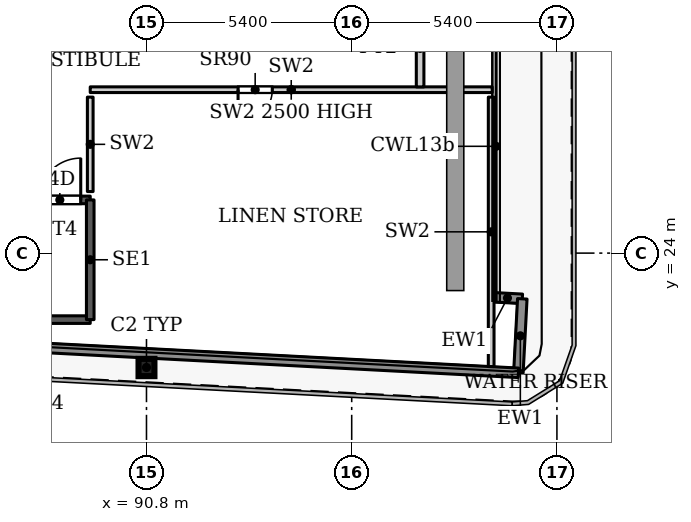
"""IFC4 building model, lengths in metres.
Left out: names, types, materials, properties, quantities, classifications, styles, units other than length and angle.
Written with IfcOpenShell. Run it as: python <this file> out.ifc"""

import sys

from ifc_helpers import new_model, si_unit, direction, frame, frame_2d, origin, origin_2d, place, context, subcontext, project, spatial, rectangle, i_section, extrude, source, transform, mapped, element, fill, save


model = new_model("IFC4")
c1 = context("Model", 3, precision=1e-05, world=origin(), true_north=direction((0.0, 1.0)))
c2 = subcontext(c1, "Body", "Model", "MODEL_VIEW")
j1 = project(units=[si_unit("LENGTHUNIT", "METRE"), si_unit("PLANEANGLEUNIT", "RADIAN")], contexts=[c1])
p1 = place(None, origin())
s1 = spatial("IfcSite", under=j1, at=p1, CompositionType="ELEMENT")
p2 = place(p1, origin())
s2 = spatial("IfcBuilding", under=s1, at=p2, CompositionType="ELEMENT")
p3 = place(p2, frame((0.0, 0.0, 117.5)))
s3 = spatial("IfcBuildingStorey", under=s2, at=p3, CompositionType="ELEMENT", Elevation=117.5)
p4 = place(p3, frame((90.8, 20.99, 0.0), z_axis=(0.0, 0.0, 1.0), x_axis=(1.0, 0.0, 0.0)))
e1 = element("IfcColumn", 1, at=p4, inside=s3, PredefinedType="COLUMN", context=c2, shape_type="SweptSolid", body=[
    extrude(i_section(OverallWidth=0.418, OverallDepth=0.455, WebThickness=0.042, FlangeThickness=0.068, FilletRadius=0.014, at=origin_2d()), origin(), (0.0, 0.0, 1.0), 3.9),
])
p5 = place(p3, frame((99.907, 22.839, 0.0), z_axis=(0.0, 0.0, 1.0), x_axis=(0.998561284263, -0.053622398031, 0.0)))
e2 = element("IfcWall", 2, at=p5, inside=s3, PredefinedType="SOLIDWALL", context=c2, shape_type="SweptSolid", body=[
    extrude(rectangle(XDim=0.783, YDim=0.25, at=frame_2d((0.392, 0.0))), origin(), (0.0, 0.0, 1.0), 3.75),
])
p6 = place(p3, frame((100.689, 22.797, 0.0), z_axis=(0.0, 0.0, 1.0), x_axis=(-0.052841433274, -0.998602915542, 0.0)))
e3 = element("IfcWall", 3, at=p6, inside=s3, PredefinedType="SOLIDWALL", context=c2, shape_type="SweptSolid", body=[
    extrude(rectangle(XDim=1.95, YDim=0.25, at=frame_2d((0.975, 0.0))), origin(), (0.0, 0.0, 1.0), 3.75),
])
p7 = place(p3, frame((100.586, 20.85, 0.0), z_axis=(0.0, 0.0, 1.0), x_axis=(-0.99861746497, 0.052565755559, 0.0)))
e4 = element("IfcWall", 4, at=p7, inside=s3, PredefinedType="SOLIDWALL", context=c2, shape_type="SweptSolid", body=[
    extrude(rectangle(XDim=66.639, YDim=0.25, at=frame_2d((33.319, 0.0))), origin(), (0.0, 0.0, 1.0), 3.75),
])
p8 = place(p3, frame((80.16, 22.25, 0.0), z_axis=(0.0, 0.0, 1.0), x_axis=(1.0, 0.0, 0.0)))
e5 = element("IfcWall", 5, at=p8, inside=s3, PredefinedType="SHEAR", context=c2, shape_type="SweptSolid", body=[
    extrude(rectangle(XDim=9.16, YDim=0.2, at=frame_2d((4.58, 0.0))), origin(), (0.0, 0.0, 1.0), 3.9),
])
p9 = place(p3, frame((80.16, 25.4, 0.0), z_axis=(0.0, 0.0, 1.0), x_axis=(1.0, 0.0, 0.0)))
e6 = element("IfcWall", 6, at=p9, inside=s3, PredefinedType="SHEAR", context=c2, shape_type="SweptSolid", body=[
    extrude(rectangle(XDim=9.16, YDim=0.2, at=frame_2d((4.58, 0.0))), origin(), (0.0, 0.0, 1.0), 3.9),
])
p10 = place(p9, frame((7.81, 0.0, 0.0)))
e7 = element("IfcOpeningElement", 7, at=p10, cuts=e6, PredefinedType="OPENING", context=c2, shape_type="SweptSolid", body=[
    extrude(rectangle(XDim=1.1, YDim=2.2, at=frame_2d((0.55, 1.1))), frame((0.0, 0.11, 0.0), z_axis=(0.0, -1.0, 0.0), x_axis=(1.0, 0.0, 0.0)), (0.0, 0.0, 1.0), 0.22),
])
p11 = place(p3, frame((89.32, 22.25, 0.0), z_axis=(0.0, 0.0, 1.0), x_axis=(0.0, 1.0, 0.0)))
e8 = element("IfcWall", 8, at=p11, inside=s3, PredefinedType="SHEAR", context=c2, shape_type="SweptSolid", body=[
    extrude(rectangle(XDim=3.15, YDim=0.2, at=frame_2d((1.575, 0.0))), origin(), (0.0, 0.0, 1.0), 3.9),
])
p12 = place(p3, frame((89.32, 28.3, 0.0), z_axis=(0.0, 0.0, 1.0), x_axis=(1.0, 0.0, 0.0)))
e9 = element("IfcWall", 9, at=p12, inside=s3, PredefinedType="PARTITIONING", context=c2, shape_type="SweptSolid", body=[
    extrude(rectangle(XDim=10.578, YDim=0.15, at=frame_2d((5.289, 0.0))), origin(), (0.0, 0.0, 1.0), 2.5),
])
p13 = place(p12, frame((3.89, 0.0, 0.0)))
e10 = element("IfcOpeningElement", 10, at=p13, cuts=e9, PredefinedType="OPENING", context=c2, shape_type="SweptSolid", body=[
    extrude(rectangle(XDim=0.9, YDim=2.2, at=frame_2d((0.45, 1.1))), frame((0.0, 0.085, 0.0), z_axis=(0.0, -1.0, 0.0), x_axis=(1.0, 0.0, 0.0)), (0.0, 0.0, 1.0), 0.17),
])
p14 = place(p3, frame((89.32, 25.62, 0.0), z_axis=(0.0, 0.0, 1.0), x_axis=(0.0, 1.0, 0.0)))
e11 = element("IfcWall", 11, at=p14, inside=s3, PredefinedType="PARTITIONING", context=c2, shape_type="SweptSolid", body=[
    extrude(rectangle(XDim=2.485, YDim=0.15, at=frame_2d((1.242, 0.0))), origin(), (0.0, 0.0, 1.0), 3.9),
])
p15 = place(p3, frame((99.87, 21.015, 0.0), z_axis=(0.0, 0.0, 1.0), x_axis=(0.0, 1.0, 0.0)))
e12 = element("IfcWall", 12, at=p15, inside=s3, PredefinedType="PARTITIONING", context=c2, shape_type="SweptSolid", body=[
    extrude(rectangle(XDim=7.09, YDim=0.15, at=frame_2d((3.545, 0.0))), origin(), (0.0, 0.0, 1.0), 3.9),
])
p16 = place(p3, frame((98.0, 28.374, 0.0), z_axis=(0.0, 0.0, 1.0), x_axis=(0.0, 1.0, 0.0)))
e13 = element("IfcWall", 13, at=p16, inside=s3, PredefinedType="PARTITIONING", context=c2, shape_type="SweptSolid", body=[
    extrude(rectangle(XDim=2.026, YDim=0.2, at=frame_2d((1.013, 0.0))), origin(), (0.0, 0.0, 1.0), 3.6),
])
m1 = source(origin(), c2, "Body", "SweptSolid", [
    extrude(rectangle(XDim=0.9, YDim=2.2, at=frame_2d((0.45, 1.1))), frame((0.0, 0.025, 0.0), z_axis=(0.0, -1.0, 0.0), x_axis=(1.0, 0.0, 0.0)), (0.0, 0.0, 1.0), 0.05),
])
p17 = place(p13, origin())
e14 = element("IfcDoor", 14, at=p17, inside=s3, OperationType="SINGLE_SWING_RIGHT", PredefinedType="DOOR", context=c2, shape_type="MappedRepresentation", body=[
    mapped(m1, transform((0.0, 0.0, 0.0), x_axis=(1.0, 0.0, 0.0), y_axis=(0.0, 1.0, 0.0), z_axis=(0.0, 0.0, 1.0), scale=1.0)),
])
fill(e10, e14)
m2 = source(origin(), c2, "Body", "SweptSolid", [
    extrude(rectangle(XDim=1.1, YDim=2.2, at=frame_2d((0.55, 1.1))), frame((0.0, 0.025, 0.0), z_axis=(0.0, -1.0, 0.0), x_axis=(1.0, 0.0, 0.0)), (0.0, 0.0, 1.0), 0.05),
])
p18 = place(p10, origin())
e15 = element("IfcDoor", 15, at=p18, inside=s3, OperationType="SINGLE_SWING_LEFT", PredefinedType="DOOR", context=c2, shape_type="MappedRepresentation", body=[
    mapped(m2, transform((0.0, 0.0, 0.0), x_axis=(1.0, 0.0, 0.0), y_axis=(0.0, 1.0, 0.0), z_axis=(0.0, 0.0, 1.0), scale=1.0)),
])
fill(e7, e15)
save(model, sys.argv[1])
